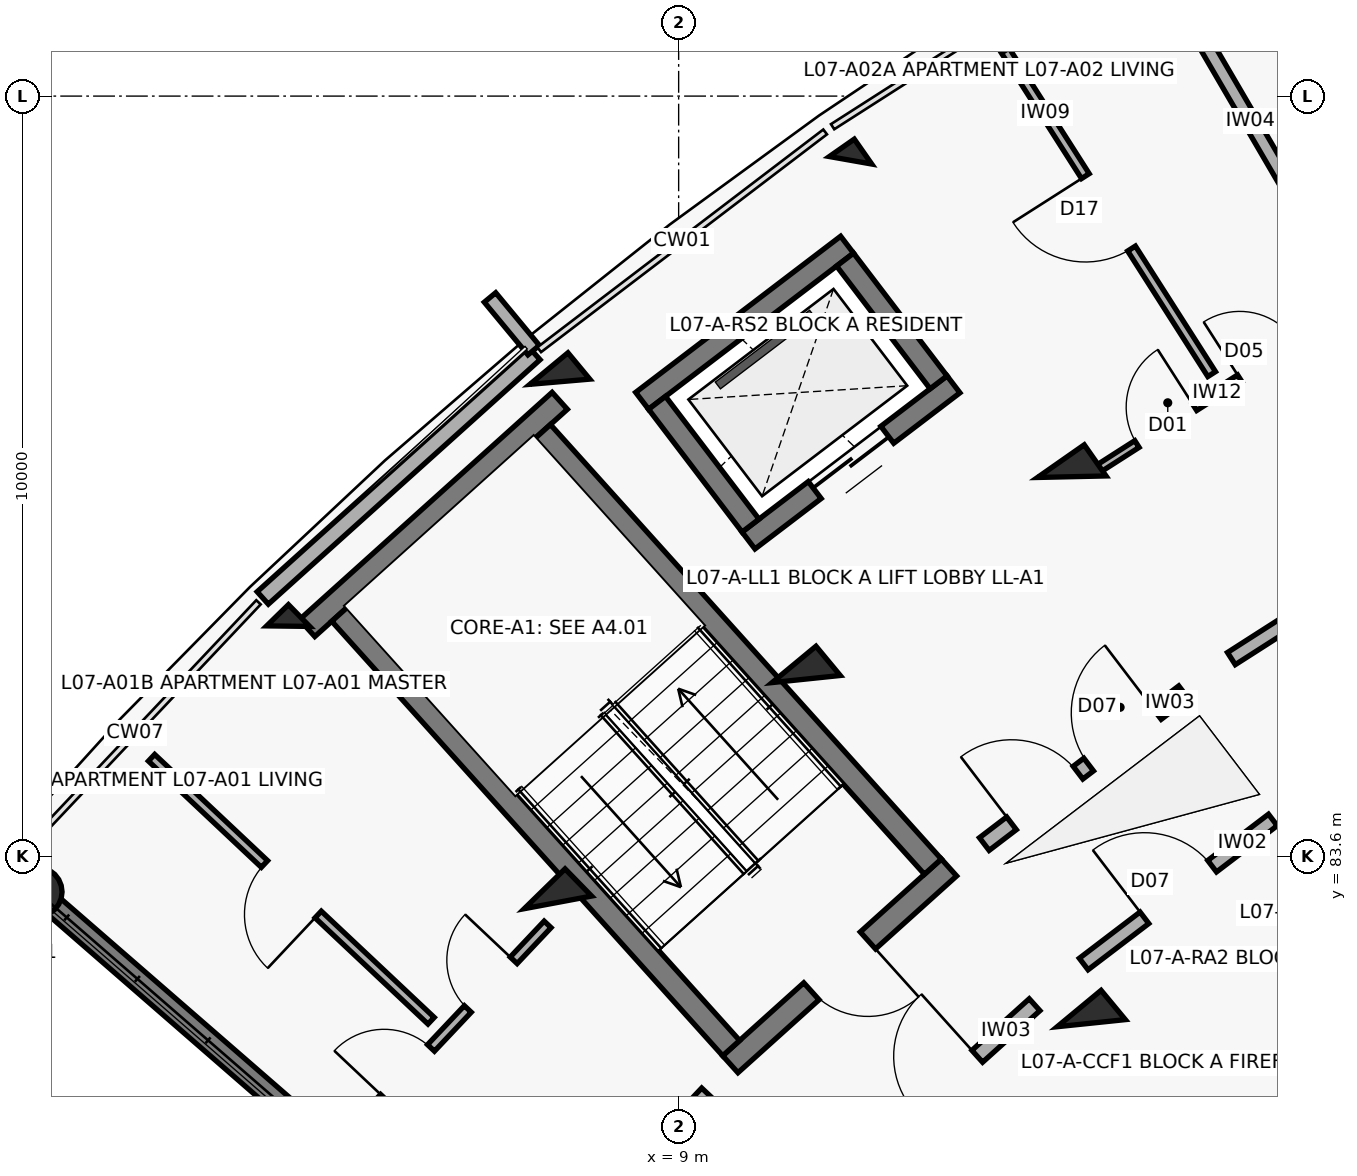
"""IFC4 building model, lengths in metres.
Left out: names, types, materials, properties, quantities, classifications, styles, units other than length and angle.
Written with IfcOpenShell. Run it as: python <this file> out.ifc"""

import sys

from ifc_helpers import new_model, si_unit, direction, frame, frame_2d, origin, origin_2d, place, context, subcontext, project, spatial, rectangle, circle, extrude, element, fill, save


model = new_model("IFC4")
c1 = context("Model", 3, precision=1e-05, world=origin(), true_north=direction((0.0, 1.0)))
c2 = subcontext(c1, "Body", "Model", "MODEL_VIEW")
j1 = project(units=[si_unit("LENGTHUNIT", "METRE"), si_unit("PLANEANGLEUNIT", "RADIAN")], contexts=[c1])
p1 = place(None, origin())
s1 = spatial("IfcSite", under=j1, at=p1, CompositionType="ELEMENT")
p2 = place(p1, origin())
s2 = spatial("IfcBuilding", under=s1, at=p2, CompositionType="ELEMENT")
p3 = place(p2, frame((0.0, 0.0, 23.6)))
s3 = spatial("IfcBuildingStorey", under=s2, at=p3, CompositionType="ELEMENT", Elevation=23.6)
p4 = place(p3, frame((0.563, 83.129, 0.0), z_axis=(0.0, 0.0, 1.0), x_axis=(-0.754709580223, 0.656059028991, 0.0)))
e1 = element("IfcColumn", 1, at=p4, inside=s3, PredefinedType="COLUMN", context=c2, shape_type="SweptSolid", body=[
    extrude(circle(Radius=0.325, at=origin_2d()), origin(), (0.0, 0.0, 1.0), 3.1),
])
p5 = place(p3, frame((7.412, 82.991, 0.0), z_axis=(0.0, 0.0, 1.0), x_axis=(-0.698665066769, 0.715448897181, 0.0)))
e2 = element("IfcColumn", 2, at=p5, inside=s3, PredefinedType="COLUMN", context=c2, shape_type="SweptSolid", body=[
    extrude(rectangle(XDim=0.5, YDim=0.75, at=origin_2d()), origin(), (0.0, 0.0, 1.0), 3.1),
])
p6 = place(p3, frame((3.863, 86.626, 0.0), z_axis=(0.0, 0.0, 1.0), x_axis=(-0.698665066769, 0.715448897181, 0.0)))
e3 = element("IfcColumn", 3, at=p6, inside=s3, PredefinedType="COLUMN", context=c2, shape_type="SweptSolid", body=[
    extrude(rectangle(XDim=0.4, YDim=0.4, at=origin_2d()), origin(), (0.0, 0.0, 1.0), 3.1),
])
for number, where, z_axis, x_axis in (
    (4, (14.429, 81.402, 0.0), (0.0, 0.0, 1.0), (-0.638, 0.77, 0.0)),
    (5, (10.678, 85.93, 0.0), (0.0, 0.0, 1.0), (-0.638, 0.77, 0.0)),
):
    element("IfcColumn", number, at=place(p3, frame(where, z_axis=z_axis, x_axis=x_axis)), inside=s3, PredefinedType="COLUMN", context=c2, shape_type="SweptSolid", body=[
        extrude(rectangle(XDim=0.5, YDim=0.75, at=origin_2d()), origin(), (0.0, 0.0, 1.0), 3.1),
    ])
p7 = place(p3, frame((7.437, 89.842, 0.0), z_axis=(0.0, 0.0, 1.0), x_axis=(-0.637961754089, 0.770068049148, 0.0)))
e6 = element("IfcColumn", 6, at=p7, inside=s3, PredefinedType="COLUMN", context=c2, shape_type="SweptSolid", body=[
    extrude(rectangle(XDim=0.45, YDim=0.65, at=origin_2d()), origin(), (0.0, 0.0, 1.0), 3.1),
])
p8 = place(p3, frame((14.172, 88.592, 0.0), z_axis=(0.0, 0.0, 1.0), x_axis=(-0.573004420611, 0.819552276527, 0.0)))
e7 = element("IfcColumn", 7, at=p8, inside=s3, PredefinedType="COLUMN", context=c2, shape_type="SweptSolid", body=[
    extrude(rectangle(XDim=0.5, YDim=0.75, at=origin_2d()), origin(), (0.0, 0.0, 1.0), 3.1),
])
p9 = place(p3, frame((11.261, 92.755, 0.0), z_axis=(0.0, 0.0, 1.0), x_axis=(-0.573004420611, 0.819552276527, 0.0)))
e8 = element("IfcColumn", 8, at=p9, inside=s3, PredefinedType="COLUMN", context=c2, shape_type="SweptSolid", body=[
    extrude(rectangle(XDim=0.4, YDim=0.4, at=origin_2d()), origin(), (0.0, 0.0, 1.0), 3.1),
])
p10 = place(p3, frame((4.261, 79.914, 0.0), z_axis=(0.0, 0.0, 1.0), x_axis=(-0.754703505217, 0.65606601742, 0.0)))
e9 = element("IfcWall", 9, at=p10, inside=s3, PredefinedType="SHEAR", context=c2, shape_type="SweptSolid", body=[
    extrude(rectangle(XDim=4.72, YDim=0.27, at=frame_2d((2.36, 0.0))), origin(), (0.0, 0.0, 1.0), 2.86),
])
p11 = place(p3, frame((3.528, 86.997, 0.0), z_axis=(0.0, 0.0, 1.0), x_axis=(0.743387539862, 0.668860946369, 0.0)))
e10 = element("IfcWall", 10, at=p11, inside=s3, PredefinedType="SOLIDWALL", context=c2, shape_type="SweptSolid", body=[
    extrude(rectangle(XDim=4.809, YDim=0.22, at=frame_2d((2.405, 0.0))), origin(), (0.0, 0.0, 1.0), 2.25),
])
p12 = place(p3, frame((7.092, 90.257, 0.0), z_axis=(0.0, 0.0, 1.0), x_axis=(-0.637967316825, 0.770063440674, 0.0)))
e11 = element("IfcWall", 11, at=p12, inside=s3, PredefinedType="PARAPET", context=c2, shape_type="SweptSolid", body=[
    extrude(rectangle(XDim=0.9, YDim=0.195, at=frame_2d((0.45, 0.0))), origin(), (0.0, 0.0, 1.0), 2.25),
])
p13 = place(p3, frame((12.557, 83.45, 0.0), z_axis=(0.0, 0.0, 1.0), x_axis=(-0.743375696158, -0.668874109501, 0.0)))
e12 = element("IfcWall", 12, at=p13, inside=s3, PredefinedType="SHEAR", context=c2, shape_type="SweptSolid", body=[
    extrude(rectangle(XDim=3.87, YDim=0.3, at=frame_2d((1.935, 0.0))), origin(), (0.0, 0.0, 1.0), 3.1),
])
p14 = place(p13, frame((1.435, 0.0, 0.0)))
e13 = element("IfcOpeningElement", 13, at=p14, cuts=e12, PredefinedType="OPENING", context=c2, shape_type="SweptSolid", body=[
    extrude(rectangle(XDim=1.0, YDim=2.15, at=frame_2d((0.5, 1.075))), frame((0.0, 0.16, 0.0), z_axis=(0.0, -1.0, 0.0), x_axis=(1.0, 0.0, 0.0)), (0.0, 0.0, 1.0), 0.32),
])
p15 = place(p3, frame((7.436, 89.59, 0.0), z_axis=(0.0, 0.0, 1.0), x_axis=(-0.743400052815, -0.668847038922, 0.0)))
e14 = element("IfcWall", 14, at=p15, inside=s3, PredefinedType="SHEAR", context=c2, shape_type="SweptSolid", body=[
    extrude(rectangle(XDim=4.47, YDim=0.3, at=frame_2d((2.235, 0.0))), origin(), (0.0, 0.0, 1.0), 3.1),
])
p16 = place(p3, frame((12.345, 83.461, 0.0), z_axis=(0.0, 0.0, 1.0), x_axis=(-0.668868253964, 0.743380964808, 0.0)))
e15 = element("IfcWall", 15, at=p16, inside=s3, PredefinedType="SHEAR", context=c2, shape_type="SweptSolid", body=[
    extrude(rectangle(XDim=7.69, YDim=0.3, at=frame_2d((3.845, 0.0))), origin(), (0.0, 0.0, 1.0), 3.1),
])
p17 = place(p3, frame((9.691, 81.073, 0.0), z_axis=(0.0, 0.0, 1.0), x_axis=(-0.668885797871, 0.743365179038, 0.0)))
e16 = element("IfcWall", 16, at=p17, inside=s3, PredefinedType="SHEAR", context=c2, shape_type="SweptSolid", body=[
    extrude(rectangle(XDim=7.69, YDim=0.3, at=frame_2d((3.845, 0.0))), origin(), (0.0, 0.0, 1.0), 3.1),
])
p18 = place(p3, frame((12.616, 89.807, 0.0), z_axis=(0.0, 0.0, 1.0), x_axis=(-0.795474703455, -0.605986795371, 0.0)))
e17 = element("IfcWall", 17, at=p18, inside=s3, PredefinedType="SHEAR", context=c2, shape_type="SweptSolid", body=[
    extrude(rectangle(XDim=3.39, YDim=0.28, at=frame_2d((1.695, 0.0))), origin(), (0.0, 0.0, 1.0), 3.1),
])
p19 = place(p18, frame((1.095, 0.0, 0.0)))
e18 = element("IfcOpeningElement", 18, at=p19, cuts=e17, PredefinedType="OPENING", context=c2, shape_type="SweptSolid", body=[
    extrude(rectangle(XDim=1.2, YDim=2.15, at=frame_2d((0.6, 1.075))), frame((0.0, 0.15, 0.0), z_axis=(0.0, -1.0, 0.0), x_axis=(1.0, 0.0, 0.0)), (0.0, 0.0, 1.0), 0.3),
])
p20 = place(p3, frame((11.216, 91.645, 0.0), z_axis=(0.0, 0.0, 1.0), x_axis=(-0.795439986025, -0.606032365994, 0.0)))
e19 = element("IfcWall", 19, at=p20, inside=s3, PredefinedType="SHEAR", context=c2, shape_type="SweptSolid", body=[
    extrude(rectangle(XDim=3.39, YDim=0.28, at=frame_2d((1.695, 0.0))), origin(), (0.0, 0.0, 1.0), 3.1),
])
p21 = place(p3, frame((12.42, 89.834, 0.0), z_axis=(0.0, 0.0, 1.0), x_axis=(-0.605948992168, 0.795503500238, 0.0)))
e20 = element("IfcWall", 20, at=p21, inside=s3, PredefinedType="SHEAR", context=c2, shape_type="SweptSolid", body=[
    extrude(rectangle(XDim=2.03, YDim=0.28, at=frame_2d((1.015, 0.0))), origin(), (0.0, 0.0, 1.0), 3.1),
])
p22 = place(p3, frame((9.946, 87.949, 0.0), z_axis=(0.0, 0.0, 1.0), x_axis=(-0.605891019062, 0.795547656033, 0.0)))
e21 = element("IfcWall", 21, at=p22, inside=s3, PredefinedType="SHEAR", context=c2, shape_type="SweptSolid", body=[
    extrude(rectangle(XDim=2.03, YDim=0.28, at=frame_2d((1.015, 0.0))), origin(), (0.0, 0.0, 1.0), 3.1),
])
p23 = place(p3, frame((7.014, 77.984, 0.0), z_axis=(0.0, 0.0, 1.0), x_axis=(0.686310507227, 0.727308660522, 0.0)))
e22 = element("IfcWall", 22, at=p23, inside=s3, PredefinedType="SOLIDWALL", context=c2, shape_type="SweptSolid", body=[
    extrude(rectangle(XDim=3.436, YDim=0.19, at=frame_2d((1.718, 0.0))), origin(), (0.0, 0.0, 1.0), 2.08),
])
p24 = place(p23, frame((1.208, 0.0, 0.0)))
e23 = element("IfcOpeningElement", 23, at=p24, cuts=e22, PredefinedType="OPENING", context=c2, shape_type="SweptSolid", body=[
    extrude(rectangle(XDim=1.02, YDim=2.15, at=frame_2d((0.51, 1.075))), frame((0.0, 0.105, 0.0), z_axis=(0.0, -1.0, 0.0), x_axis=(1.0, 0.0, 0.0)), (0.0, 0.0, 1.0), 0.21),
])
p25 = place(p3, frame((4.678, 79.948, 0.0), z_axis=(0.0, 0.0, 1.0), x_axis=(0.686331812627, 0.72728855551, 0.0)))
e24 = element("IfcWall", 24, at=p25, inside=s3, PredefinedType="PARTITIONING", context=c2, shape_type="SweptSolid", body=[
    extrude(rectangle(XDim=3.785, YDim=0.125, at=frame_2d((1.893, 0.0))), origin(), (0.0, 0.0, 1.0), 2.08),
])
p26 = place(p25, frame((0.65, 0.0, 0.0)))
e25 = element("IfcOpeningElement", 25, at=p26, cuts=e24, PredefinedType="OPENING", context=c2, shape_type="SweptSolid", body=[
    extrude(rectangle(XDim=0.9, YDim=2.1, at=frame_2d((0.45, 1.05))), frame((0.0, 0.073, 0.0), z_axis=(0.0, -1.0, 0.0), x_axis=(1.0, 0.0, 0.0)), (0.0, 0.0, 1.0), 0.145),
])
p27 = place(p25, frame((2.255, 0.0, 0.0)))
e26 = element("IfcOpeningElement", 26, at=p27, cuts=e24, PredefinedType="OPENING", context=c2, shape_type="SweptSolid", body=[
    extrude(rectangle(XDim=0.88, YDim=2.1, at=frame_2d((0.44, 1.05))), frame((0.0, 0.073, 0.0), z_axis=(0.0, -1.0, 0.0), x_axis=(1.0, 0.0, 0.0)), (0.0, 0.0, 1.0), 0.145),
])
p28 = place(p3, frame((5.743, 81.434, 0.0), z_axis=(0.0, 0.0, 1.0), x_axis=(-0.72831636485, 0.685241032551, 0.0)))
e27 = element("IfcWall", 27, at=p28, inside=s3, PredefinedType="PARTITIONING", context=c2, shape_type="SweptSolid", body=[
    extrude(rectangle(XDim=5.05, YDim=0.12, at=frame_2d((2.525, 0.0))), origin(), (0.0, 0.0, 1.0), 2.08),
])
p29 = place(p28, frame((2.04, 0.0, 0.0)))
e28 = element("IfcOpeningElement", 28, at=p29, cuts=e27, PredefinedType="OPENING", context=c2, shape_type="SweptSolid", body=[
    extrude(rectangle(XDim=0.97, YDim=2.1, at=frame_2d((0.485, 1.05))), frame((0.0, 0.07, 0.0), z_axis=(0.0, -1.0, 0.0), x_axis=(1.0, 0.0, 0.0)), (0.0, 0.0, 1.0), 0.14),
])
p30 = place(p3, frame((11.357, 79.552, 0.0), z_axis=(0.0, 0.0, 1.0), x_axis=(0.743387266925, 0.668861249718, 0.0)))
e29 = element("IfcWall", 29, at=p30, inside=s3, PredefinedType="SOLIDWALL", context=c2, shape_type="SweptSolid", body=[
    extrude(rectangle(XDim=3.128, YDim=0.21, at=frame_2d((1.564, 0.0))), origin(), (0.0, 0.0, 1.0), 2.08),
])
p31 = place(p30, frame((1.014, 0.0, 0.0)))
e30 = element("IfcOpeningElement", 30, at=p31, cuts=e29, PredefinedType="OPENING", context=c2, shape_type="SweptSolid", body=[
    extrude(rectangle(XDim=1.1, YDim=2.15, at=frame_2d((0.55, 1.075))), frame((0.0, 0.115, 0.0), z_axis=(0.0, -1.0, 0.0), x_axis=(1.0, 0.0, 0.0)), (0.0, 0.0, 1.0), 0.23),
])
p32 = place(p3, frame((13.021, 83.759, 0.0), z_axis=(0.0, 0.0, 1.0), x_axis=(0.795498026433, 0.605956178235, 0.0)))
e31 = element("IfcWall", 31, at=p32, inside=s3, PredefinedType="SOLIDWALL", context=c2, shape_type="SweptSolid", body=[
    extrude(rectangle(XDim=3.296, YDim=0.21, at=frame_2d((1.648, 0.0))), origin(), (0.0, 0.0, 1.0), 2.08),
])
p33 = place(p32, frame((0.45, 0.0, 0.0)))
e32 = element("IfcOpeningElement", 32, at=p33, cuts=e31, PredefinedType="OPENING", context=c2, shape_type="SweptSolid", body=[
    extrude(rectangle(XDim=1.1, YDim=2.15, at=frame_2d((0.55, 1.075))), frame((0.0, 0.115, 0.0), z_axis=(0.0, -1.0, 0.0), x_axis=(1.0, 0.0, 0.0)), (0.0, 0.0, 1.0), 0.23),
])
p34 = place(p32, frame((1.726, 0.0, 0.0)))
e33 = element("IfcOpeningElement", 33, at=p34, cuts=e31, PredefinedType="OPENING", context=c2, shape_type="SweptSolid", body=[
    extrude(rectangle(XDim=1.12, YDim=2.15, at=frame_2d((0.56, 1.075))), frame((0.0, 0.115, 0.0), z_axis=(0.0, -1.0, 0.0), x_axis=(1.0, 0.0, 0.0)), (0.0, 0.0, 1.0), 0.23),
])
p35 = place(p3, frame((14.329, 82.18, 0.0), z_axis=(0.0, 0.0, 1.0), x_axis=(0.795501577908, 0.605951515838, 0.0)))
e34 = element("IfcWall", 34, at=p35, inside=s3, PredefinedType="SOLIDWALL", context=c2, shape_type="SweptSolid", body=[
    extrude(rectangle(XDim=3.129, YDim=0.19, at=frame_2d((1.564, 0.0))), origin(), (0.0, 0.0, 1.0), 2.08),
])
p36 = place(p35, frame((1.004, 0.0, 0.0)))
e35 = element("IfcOpeningElement", 35, at=p36, cuts=e34, PredefinedType="OPENING", context=c2, shape_type="SweptSolid", body=[
    extrude(rectangle(XDim=1.12, YDim=2.15, at=frame_2d((0.56, 1.075))), frame((0.0, 0.105, 0.0), z_axis=(0.0, -1.0, 0.0), x_axis=(1.0, 0.0, 0.0)), (0.0, 0.0, 1.0), 0.21),
])
p37 = place(p3, frame((16.272, 86.199, 0.0), z_axis=(0.0, 0.0, 1.0), x_axis=(0.842257205985, 0.539075874963, 0.0)))
e36 = element("IfcWall", 36, at=p37, inside=s3, PredefinedType="SOLIDWALL", context=c2, shape_type="SweptSolid", body=[
    extrude(rectangle(XDim=3.436, YDim=0.19, at=frame_2d((1.718, 0.0))), origin(), (0.0, 0.0, 1.0), 2.08),
])
p38 = place(p37, frame((1.228, 0.0, 0.0)))
e37 = element("IfcOpeningElement", 37, at=p38, cuts=e36, PredefinedType="OPENING", context=c2, shape_type="SweptSolid", body=[
    extrude(rectangle(XDim=0.98, YDim=2.15, at=frame_2d((0.49, 1.075))), frame((0.0, 0.105, 0.0), z_axis=(0.0, -1.0, 0.0), x_axis=(1.0, 0.0, 0.0)), (0.0, 0.0, 1.0), 0.21),
])
p39 = place(p3, frame((14.482, 88.672, 0.0), z_axis=(0.0, 0.0, 1.0), x_axis=(0.842245628842, 0.539093962771, 0.0)))
e38 = element("IfcWall", 38, at=p39, inside=s3, PredefinedType="PARTITIONING", context=c2, shape_type="SweptSolid", body=[
    extrude(rectangle(XDim=3.785, YDim=0.105, at=frame_2d((1.893, 0.0))), origin(), (0.0, 0.0, 1.0), 2.08),
])
p40 = place(p39, frame((0.65, 0.0, 0.0)))
e39 = element("IfcOpeningElement", 39, at=p40, cuts=e38, PredefinedType="OPENING", context=c2, shape_type="SweptSolid", body=[
    extrude(rectangle(XDim=0.9, YDim=2.1, at=frame_2d((0.45, 1.05))), frame((0.0, 0.062, 0.0), z_axis=(0.0, -1.0, 0.0), x_axis=(1.0, 0.0, 0.0)), (0.0, 0.0, 1.0), 0.125),
])
p41 = place(p39, frame((2.255, 0.0, 0.0)))
e40 = element("IfcOpeningElement", 40, at=p41, cuts=e38, PredefinedType="OPENING", context=c2, shape_type="SweptSolid", body=[
    extrude(rectangle(XDim=0.88, YDim=2.1, at=frame_2d((0.44, 1.05))), frame((0.0, 0.062, 0.0), z_axis=(0.0, -1.0, 0.0), x_axis=(1.0, 0.0, 0.0)), (0.0, 0.0, 1.0), 0.125),
])
p42 = place(p3, frame((16.013, 89.942, 0.0), z_axis=(0.0, 0.0, 1.0), x_axis=(-0.537785480308, 0.843081714409, 0.0)))
e41 = element("IfcWall", 41, at=p42, inside=s3, PredefinedType="PARTITIONING", context=c2, shape_type="SweptSolid", body=[
    extrude(rectangle(XDim=5.05, YDim=0.12, at=frame_2d((2.525, 0.0))), origin(), (0.0, 0.0, 1.0), 2.08),
])
p43 = place(p42, frame((1.96, 0.0, 0.0)))
e42 = element("IfcOpeningElement", 42, at=p43, cuts=e41, PredefinedType="OPENING", context=c2, shape_type="SweptSolid", body=[
    extrude(rectangle(XDim=1.13, YDim=2.1, at=frame_2d((0.565, 1.05))), frame((0.0, 0.07, 0.0), z_axis=(0.0, -1.0, 0.0), x_axis=(1.0, 0.0, 0.0)), (0.0, 0.0, 1.0), 0.14),
])
p44 = place(p3, frame((17.621, 91.392, 0.0), z_axis=(0.0, 0.0, 1.0), x_axis=(-0.504216452091, 0.863577309475, 0.0)))
e43 = element("IfcWall", 43, at=p44, inside=s3, PredefinedType="SOLIDWALL", context=c2, shape_type="SweptSolid", body=[
    extrude(rectangle(XDim=4.35, YDim=0.185, at=frame_2d((2.175, 0.0))), origin(), (0.0, 0.0, 1.0), 2.08),
])
p45 = place(p14, origin())
e44 = element("IfcDoor", 44, at=p45, inside=s3, OperationType="SINGLE_SWING_LEFT", PredefinedType="DOOR", context=c2, shape_type="SweptSolid", body=[
    extrude(rectangle(XDim=1.0, YDim=2.15, at=frame_2d((0.5, 1.075))), frame((0.0, 0.025, 0.0), z_axis=(0.0, -1.0, 0.0), x_axis=(1.0, 0.0, 0.0)), (0.0, 0.0, 1.0), 0.05),
])
fill(e13, e44)
p46 = place(p19, origin())
e45 = element("IfcDoor", 45, at=p46, inside=s3, OperationType="DOUBLE_DOOR_SLIDING", PredefinedType="DOOR", context=c2, shape_type="SweptSolid", body=[
    extrude(rectangle(XDim=1.2, YDim=2.15, at=frame_2d((0.6, 1.075))), frame((0.0, 0.025, 0.0), z_axis=(0.0, -1.0, 0.0), x_axis=(1.0, 0.0, 0.0)), (0.0, 0.0, 1.0), 0.05),
])
fill(e18, e45)
p47 = place(p26, origin())
e46 = element("IfcDoor", 46, at=p47, inside=s3, OperationType="SINGLE_SWING_LEFT", PredefinedType="DOOR", context=c2, shape_type="SweptSolid", body=[
    extrude(rectangle(XDim=0.9, YDim=2.1, at=frame_2d((0.45, 1.05))), frame((0.0, 0.025, 0.0), z_axis=(0.0, -1.0, 0.0), x_axis=(1.0, 0.0, 0.0)), (0.0, 0.0, 1.0), 0.05),
])
fill(e25, e46)
p48 = place(p27, origin())
e47 = element("IfcDoor", 47, at=p48, inside=s3, OperationType="SINGLE_SWING_RIGHT", PredefinedType="DOOR", context=c2, shape_type="SweptSolid", body=[
    extrude(rectangle(XDim=0.88, YDim=2.1, at=frame_2d((0.44, 1.05))), frame((0.0, 0.025, 0.0), z_axis=(0.0, -1.0, 0.0), x_axis=(1.0, 0.0, 0.0)), (0.0, 0.0, 1.0), 0.05),
])
fill(e26, e47)
p49 = place(p29, origin())
e48 = element("IfcDoor", 48, at=p49, inside=s3, OperationType="SINGLE_SWING_LEFT", PredefinedType="DOOR", context=c2, shape_type="SweptSolid", body=[
    extrude(rectangle(XDim=0.97, YDim=2.1, at=frame_2d((0.485, 1.05))), frame((0.0, 0.025, 0.0), z_axis=(0.0, -1.0, 0.0), x_axis=(1.0, 0.0, 0.0)), (0.0, 0.0, 1.0), 0.05),
])
fill(e28, e48)
p50 = place(p31, origin())
e49 = element("IfcDoor", 49, at=p50, inside=s3, OperationType="SINGLE_SWING_RIGHT", PredefinedType="DOOR", context=c2, shape_type="SweptSolid", body=[
    extrude(rectangle(XDim=1.1, YDim=2.15, at=frame_2d((0.55, 1.075))), frame((0.0, 0.025, 0.0), z_axis=(0.0, -1.0, 0.0), x_axis=(1.0, 0.0, 0.0)), (0.0, 0.0, 1.0), 0.05),
])
fill(e30, e49)
p51 = place(p33, origin())
e50 = element("IfcDoor", 50, at=p51, inside=s3, OperationType="SINGLE_SWING_LEFT", PredefinedType="DOOR", context=c2, shape_type="SweptSolid", body=[
    extrude(rectangle(XDim=1.1, YDim=2.15, at=frame_2d((0.55, 1.075))), frame((0.0, 0.025, 0.0), z_axis=(0.0, -1.0, 0.0), x_axis=(1.0, 0.0, 0.0)), (0.0, 0.0, 1.0), 0.05),
])
fill(e32, e50)
p52 = place(p34, origin())
e51 = element("IfcDoor", 51, at=p52, inside=s3, OperationType="SINGLE_SWING_RIGHT", PredefinedType="DOOR", context=c2, shape_type="SweptSolid", body=[
    extrude(rectangle(XDim=1.12, YDim=2.15, at=frame_2d((0.56, 1.075))), frame((0.0, 0.025, 0.0), z_axis=(0.0, -1.0, 0.0), x_axis=(1.0, 0.0, 0.0)), (0.0, 0.0, 1.0), 0.05),
])
fill(e33, e51)
p53 = place(p36, origin())
e52 = element("IfcDoor", 52, at=p53, inside=s3, OperationType="SINGLE_SWING_LEFT", PredefinedType="DOOR", context=c2, shape_type="SweptSolid", body=[
    extrude(rectangle(XDim=1.12, YDim=2.15, at=frame_2d((0.56, 1.075))), frame((0.0, 0.025, 0.0), z_axis=(0.0, -1.0, 0.0), x_axis=(1.0, 0.0, 0.0)), (0.0, 0.0, 1.0), 0.05),
])
fill(e35, e52)
p54 = place(p40, origin())
e53 = element("IfcDoor", 53, at=p54, inside=s3, OperationType="SINGLE_SWING_RIGHT", PredefinedType="DOOR", context=c2, shape_type="SweptSolid", body=[
    extrude(rectangle(XDim=0.9, YDim=2.1, at=frame_2d((0.45, 1.05))), frame((0.0, 0.025, 0.0), z_axis=(0.0, -1.0, 0.0), x_axis=(1.0, 0.0, 0.0)), (0.0, 0.0, 1.0), 0.05),
])
fill(e39, e53)
p55 = place(p41, origin())
e54 = element("IfcDoor", 54, at=p55, inside=s3, OperationType="SINGLE_SWING_LEFT", PredefinedType="DOOR", context=c2, shape_type="SweptSolid", body=[
    extrude(rectangle(XDim=0.88, YDim=2.1, at=frame_2d((0.44, 1.05))), frame((0.0, 0.025, 0.0), z_axis=(0.0, -1.0, 0.0), x_axis=(1.0, 0.0, 0.0)), (0.0, 0.0, 1.0), 0.05),
])
fill(e40, e54)
p56 = place(p43, origin())
e55 = element("IfcDoor", 55, at=p56, inside=s3, OperationType="SINGLE_SWING_RIGHT", PredefinedType="DOOR", context=c2, shape_type="SweptSolid", body=[
    extrude(rectangle(XDim=1.13, YDim=2.1, at=frame_2d((0.565, 1.05))), frame((0.0, 0.025, 0.0), z_axis=(0.0, -1.0, 0.0), x_axis=(1.0, 0.0, 0.0)), (0.0, 0.0, 1.0), 0.05),
])
fill(e42, e55)
save(model, sys.argv[1])
